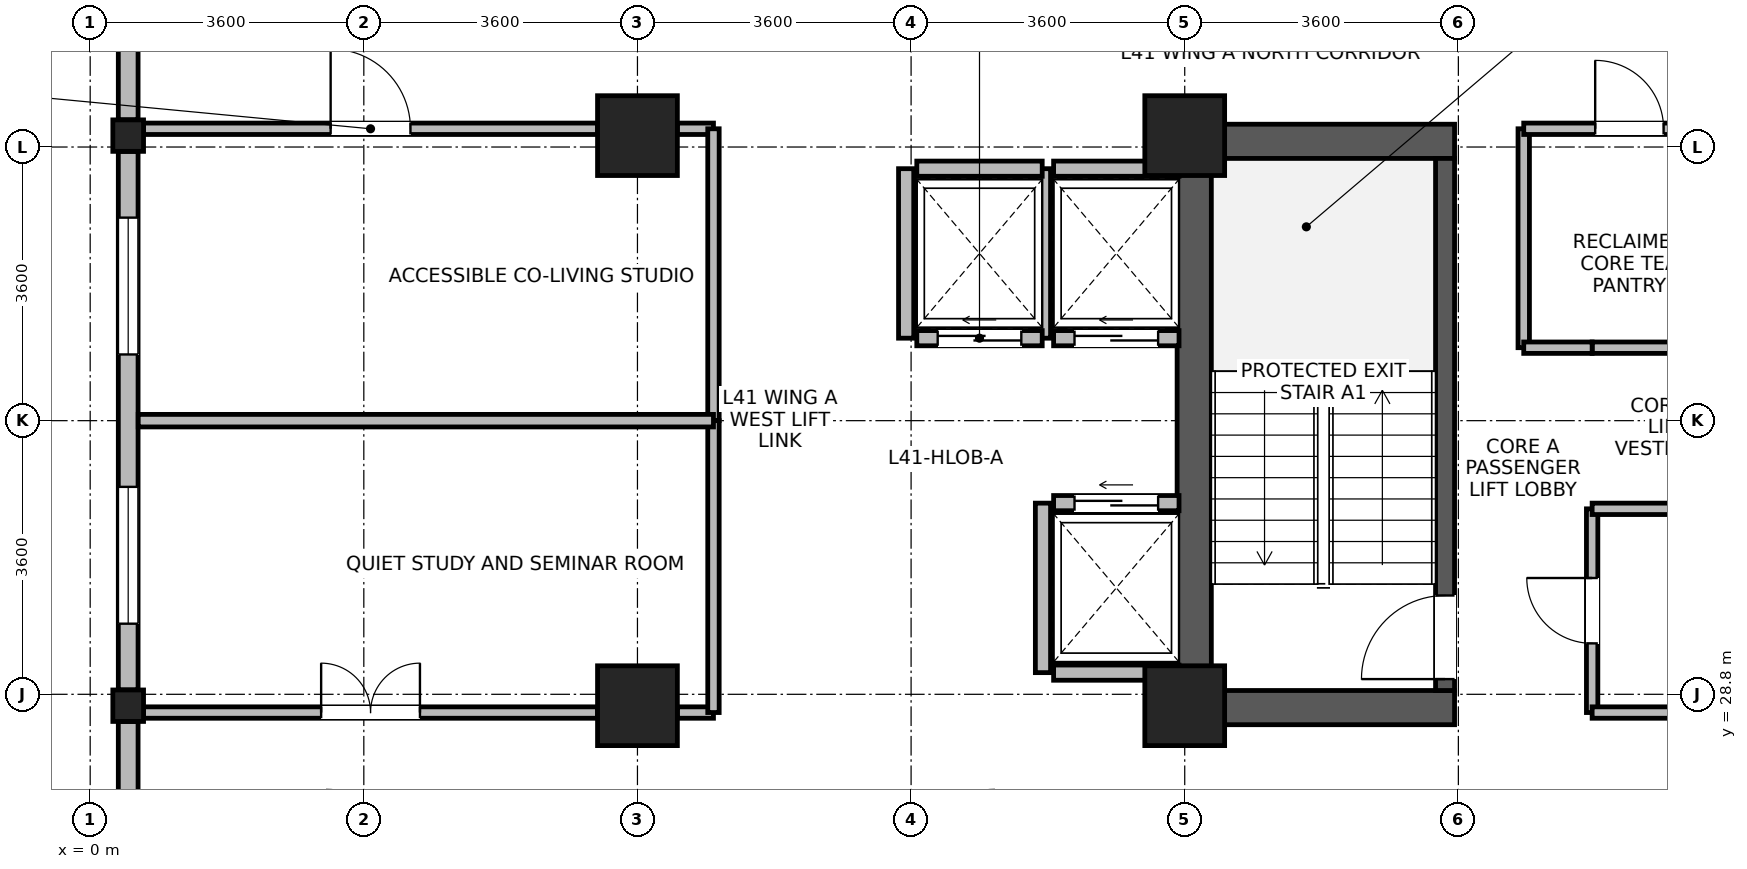
"""IFC4 building model, lengths in metres.
Left out: names, types, materials, properties, quantities, classifications, styles, units other than length and angle.
Written with IfcOpenShell. Run it as: python <this file> out.ifc"""

import sys

from ifc_helpers import new_model, si_unit, direction, frame, frame_2d, origin, origin_2d, place, context, subcontext, project, spatial, rectangle, i_section, extrude, source, transform, mapped, element, fill, save


model = new_model("IFC4")
c1 = context("Model", 3, precision=1e-05, world=origin(), true_north=direction((0.0, 1.0)))
c2 = subcontext(c1, "Body", "Model", "MODEL_VIEW")
j1 = project(units=[si_unit("LENGTHUNIT", "METRE"), si_unit("PLANEANGLEUNIT", "RADIAN")], contexts=[c1])
p1 = place(None, origin())
s1 = spatial("IfcSite", under=j1, at=p1, CompositionType="ELEMENT")
p2 = place(p1, origin())
s2 = spatial("IfcBuilding", under=s1, at=p2, CompositionType="ELEMENT")
p3 = place(p2, frame((0.0, 0.0, 162.4)))
s3 = spatial("IfcBuildingStorey", under=s2, at=p3, CompositionType="ELEMENT", Elevation=162.4)
p4 = place(p3, frame((14.525, 28.4, 0.0), z_axis=(0.0, 0.0, 1.0), x_axis=(0.0, 1.0, 0.0)))
e1 = element("IfcWall", 1, at=p4, inside=s3, PredefinedType="SHEAR", context=c2, shape_type="SweptSolid", body=[
    extrude(rectangle(XDim=7.9, YDim=0.45, at=frame_2d((3.95, 0.0))), origin(), (0.0, 0.0, 1.0), 3.46),
])
for number, where, z_axis, x_axis in (
    (2, (14.75, 28.625, 0.0), (0.0, 0.0, 1.0), (1.0, 0.0, 0.0)),
    (3, (14.75, 36.075, 0.0), (0.0, 0.0, 1.0), (1.0, 0.0, 0.0)),
):
    element("IfcWall", number, at=place(p3, frame(where, z_axis=z_axis, x_axis=x_axis)), inside=s3, PredefinedType="SHEAR", context=c2, shape_type="SweptSolid", body=[
        extrude(rectangle(XDim=3.2, YDim=0.45, at=frame_2d((1.6, 0.0))), origin(), (0.0, 0.0, 1.0), 3.46),
    ])
p5 = place(p3, frame((17.825, 28.85, 0.0), z_axis=(0.0, 0.0, 1.0), x_axis=(0.0, 1.0, 0.0)))
e4 = element("IfcWall", 4, at=p5, inside=s3, PredefinedType="SHEAR", context=c2, shape_type="SweptSolid", body=[
    extrude(rectangle(XDim=7.0, YDim=0.25, at=frame_2d((3.5, 0.0))), origin(), (0.0, 0.0, 1.0), 3.46),
])
p6 = place(p5, frame((0.15, 0.0, 0.0)))
e5 = element("IfcOpeningElement", 5, at=p6, cuts=e4, PredefinedType="OPENING", context=c2, shape_type="SweptSolid", body=[
    extrude(rectangle(XDim=1.1, YDim=2.08, at=frame_2d((0.55, 1.04))), frame((0.0, 0.135, 0.0), z_axis=(0.0, -1.0, 0.0), x_axis=(1.0, 0.0, 0.0)), (0.0, 0.0, 1.0), 0.27),
])
m1 = source(origin(), c2, "Body", "SweptSolid", [
    extrude(rectangle(XDim=1.05, YDim=1.05, at=origin_2d()), origin(), (0.0, 0.0, 1.0), 3.7),
])
for number, where, z_axis, x_axis in (
    (6, (7.2, 28.65, 0.0), (0.0, 0.0, 1.0), (1.0, 0.0, 0.0)),
    (7, (7.2, 36.15, 0.0), (0.0, 0.0, 1.0), (1.0, 0.0, 0.0)),
    (8, (14.4, 28.65, 0.0), (0.0, 0.0, 1.0), (1.0, 0.0, 0.0)),
    (9, (14.4, 36.15, 0.0), (0.0, 0.0, 1.0), (1.0, 0.0, 0.0)),
):
    element("IfcColumn", number, at=place(p3, frame(where, z_axis=z_axis, x_axis=x_axis)), inside=s3, PredefinedType="COLUMN", context=c2, shape_type="MappedRepresentation", body=[
        mapped(m1, transform((0.0, 0.0, 0.0), x_axis=(1.0, 0.0, 0.0), y_axis=(0.0, 1.0, 0.0), z_axis=(0.0, 0.0, 1.0), scale=1.0)),
    ])
m2 = source(origin(), c2, "Body", "SweptSolid", [
    extrude(i_section(OverallWidth=0.404, OverallDepth=0.414, WebThickness=0.021, FlangeThickness=0.028, FilletRadius=0.015, at=origin_2d()), origin(), (0.0, 0.0, 1.0), 3.7),
])
for number, where, z_axis, x_axis in (
    (10, (0.5, 28.65, 0.0), (0.0, 0.0, 1.0), (1.0, 0.0, 0.0)),
    (11, (0.5, 36.15, 0.0), (0.0, 0.0, 1.0), (1.0, 0.0, 0.0)),
):
    element("IfcColumn", number, at=place(p3, frame(where, z_axis=z_axis, x_axis=x_axis)), inside=s3, PredefinedType="COLUMN", context=c2, shape_type="MappedRepresentation", body=[
        mapped(m2, transform((0.0, 0.0, 0.0), x_axis=(1.0, 0.0, 0.0), y_axis=(0.0, 1.0, 0.0), z_axis=(0.0, 0.0, 1.0), scale=1.0)),
    ])
p7 = place(p3, frame((0.5, 36.358, 0.0), z_axis=(0.0, 0.0, 1.0), x_axis=(0.0, 1.0, 0.0)))
e12 = element("IfcWall", 12, at=p7, inside=s3, PredefinedType="STANDARD", context=c2, shape_type="SweptSolid", body=[
    extrude(rectangle(XDim=6.972, YDim=0.26, at=frame_2d((3.486, 0.0))), origin(), (0.0, 0.0, 1.0), 3.44),
])
p8 = place(p7, frame((4.329, 0.0, 0.85)))
e13 = element("IfcOpeningElement", 13, at=p8, cuts=e12, PredefinedType="OPENING", context=c2, shape_type="SweptSolid", body=[
    extrude(rectangle(XDim=1.8, YDim=1.85, at=frame_2d((0.9, 0.925))), frame((0.0, 0.14, 0.0), z_axis=(0.0, -1.0, 0.0), x_axis=(1.0, 0.0, 0.0)), (0.0, 0.0, 1.0), 0.28),
])
p9 = place(p7, frame((3.011, 0.0, 0.85)))
e14 = element("IfcOpeningElement", 14, at=p9, cuts=e12, PredefinedType="OPENING", context=c2, shape_type="SweptSolid", body=[
    extrude(rectangle(XDim=0.95, YDim=1.75, at=frame_2d((0.475, 0.875))), frame((0.0, 0.14, 0.0), z_axis=(0.0, -1.0, 0.0), x_axis=(1.0, 0.0, 0.0)), (0.0, 0.0, 1.0), 0.28),
])
p10 = place(p3, frame((0.5, 28.858, 0.0), z_axis=(0.0, 0.0, 1.0), x_axis=(0.0, 1.0, 0.0)))
e15 = element("IfcWall", 15, at=p10, inside=s3, PredefinedType="STANDARD", context=c2, shape_type="SweptSolid", body=[
    extrude(rectangle(XDim=7.084, YDim=0.26, at=frame_2d((3.542, 0.0))), origin(), (0.0, 0.0, 1.0), 2.99),
])
p11 = place(p10, frame((0.871, 0.0, 0.85)))
e16 = element("IfcOpeningElement", 16, at=p11, cuts=e15, PredefinedType="OPENING", context=c2, shape_type="SweptSolid", body=[
    extrude(rectangle(XDim=1.8, YDim=1.85, at=frame_2d((0.9, 0.925))), frame((0.0, 0.14, 0.0), z_axis=(0.0, -1.0, 0.0), x_axis=(1.0, 0.0, 0.0)), (0.0, 0.0, 1.0), 0.28),
])
p12 = place(p10, frame((4.413, 0.0, 0.85)))
e17 = element("IfcOpeningElement", 17, at=p12, cuts=e15, PredefinedType="OPENING", context=c2, shape_type="SweptSolid", body=[
    extrude(rectangle(XDim=1.8, YDim=1.85, at=frame_2d((0.9, 0.925))), frame((0.0, 0.14, 0.0), z_axis=(0.0, -1.0, 0.0), x_axis=(1.0, 0.0, 0.0)), (0.0, 0.0, 1.0), 0.28),
])
p13 = place(p3, frame((0.5, 21.47, 0.0), z_axis=(0.0, 0.0, 1.0), x_axis=(0.0, 1.0, 0.0)))
e18 = element("IfcWall", 18, at=p13, inside=s3, PredefinedType="STANDARD", context=c2, shape_type="SweptSolid", body=[
    extrude(rectangle(XDim=6.972, YDim=0.26, at=frame_2d((3.486, 0.0))), origin(), (0.0, 0.0, 1.0), 3.44),
])
p14 = place(p13, frame((0.843, 0.0, 0.85)))
e19 = element("IfcOpeningElement", 19, at=p14, cuts=e18, PredefinedType="OPENING", context=c2, shape_type="SweptSolid", body=[
    extrude(rectangle(XDim=1.8, YDim=1.85, at=frame_2d((0.9, 0.925))), frame((0.0, 0.14, 0.0), z_axis=(0.0, -1.0, 0.0), x_axis=(1.0, 0.0, 0.0)), (0.0, 0.0, 1.0), 0.28),
])
p15 = place(p13, frame((3.011, 0.0, 0.85)))
e20 = element("IfcOpeningElement", 20, at=p15, cuts=e18, PredefinedType="OPENING", context=c2, shape_type="SweptSolid", body=[
    extrude(rectangle(XDim=0.95, YDim=1.75, at=frame_2d((0.475, 0.875))), frame((0.0, 0.14, 0.0), z_axis=(0.0, -1.0, 0.0), x_axis=(1.0, 0.0, 0.0)), (0.0, 0.0, 1.0), 0.28),
])
p16 = place(p3, frame((12.675, 33.485, 0.0), z_axis=(0.0, 0.0, 1.0), x_axis=(1.0, 0.0, 0.0)))
e21 = element("IfcWall", 21, at=p16, inside=s3, PredefinedType="PARTITIONING", context=c2, shape_type="SweptSolid", body=[
    extrude(rectangle(XDim=1.65, YDim=0.2, at=frame_2d((0.825, 0.0))), origin(), (0.0, 0.0, 1.0), 3.44),
])
p17 = place(p16, frame((0.275, 0.0, 0.0)))
e22 = element("IfcOpeningElement", 22, at=p17, cuts=e21, PredefinedType="OPENING", context=c2, shape_type="SweptSolid", body=[
    extrude(rectangle(XDim=1.1, YDim=2.12, at=frame_2d((0.55, 1.06))), frame((0.0, 0.11, 0.0), z_axis=(0.0, -1.0, 0.0), x_axis=(1.0, 0.0, 0.0)), (0.0, 0.0, 1.0), 0.22),
])
p18 = place(p3, frame((12.675, 35.715, 0.0), z_axis=(0.0, 0.0, 1.0), x_axis=(1.0, 0.0, 0.0)))
e23 = element("IfcWall", 23, at=p18, inside=s3, PredefinedType="PARTITIONING", context=c2, shape_type="SweptSolid", body=[
    extrude(rectangle(XDim=1.65, YDim=0.2, at=frame_2d((0.825, 0.0))), origin(), (0.0, 0.0, 1.0), 3.44),
])
p19 = place(p3, frame((12.535, 33.485, 0.0), z_axis=(0.0, 0.0, 1.0), x_axis=(0.0, 1.0, 0.0)))
e24 = element("IfcWall", 24, at=p19, inside=s3, PredefinedType="PARTITIONING", context=c2, shape_type="SweptSolid", body=[
    extrude(rectangle(XDim=2.23, YDim=0.2, at=frame_2d((1.115, 0.0))), origin(), (0.0, 0.0, 1.0), 3.44),
])
p20 = place(p3, frame((12.675, 29.085, 0.0), z_axis=(0.0, 0.0, 1.0), x_axis=(1.0, 0.0, 0.0)))
e25 = element("IfcWall", 25, at=p20, inside=s3, PredefinedType="PARTITIONING", context=c2, shape_type="SweptSolid", body=[
    extrude(rectangle(XDim=1.65, YDim=0.2, at=frame_2d((0.825, 0.0))), origin(), (0.0, 0.0, 1.0), 3.44),
])
p21 = place(p3, frame((12.675, 31.315, 0.0), z_axis=(0.0, 0.0, 1.0), x_axis=(1.0, 0.0, 0.0)))
e26 = element("IfcWall", 26, at=p21, inside=s3, PredefinedType="PARTITIONING", context=c2, shape_type="SweptSolid", body=[
    extrude(rectangle(XDim=1.65, YDim=0.2, at=frame_2d((0.825, 0.0))), origin(), (0.0, 0.0, 1.0), 3.44),
])
p22 = place(p21, frame((0.275, 0.0, 0.0)))
e27 = element("IfcOpeningElement", 27, at=p22, cuts=e26, PredefinedType="OPENING", context=c2, shape_type="SweptSolid", body=[
    extrude(rectangle(XDim=1.1, YDim=2.12, at=frame_2d((0.55, 1.06))), frame((0.0, 0.11, 0.0), z_axis=(0.0, -1.0, 0.0), x_axis=(1.0, 0.0, 0.0)), (0.0, 0.0, 1.0), 0.22),
])
p23 = place(p3, frame((12.535, 29.085, 0.0), z_axis=(0.0, 0.0, 1.0), x_axis=(0.0, 1.0, 0.0)))
e28 = element("IfcWall", 28, at=p23, inside=s3, PredefinedType="PARTITIONING", context=c2, shape_type="SweptSolid", body=[
    extrude(rectangle(XDim=2.23, YDim=0.2, at=frame_2d((1.115, 0.0))), origin(), (0.0, 0.0, 1.0), 3.44),
])
p24 = place(p3, frame((10.875, 33.485, 0.0), z_axis=(0.0, 0.0, 1.0), x_axis=(1.0, 0.0, 0.0)))
e29 = element("IfcWall", 29, at=p24, inside=s3, PredefinedType="PARTITIONING", context=c2, shape_type="SweptSolid", body=[
    extrude(rectangle(XDim=1.65, YDim=0.2, at=frame_2d((0.825, 0.0))), origin(), (0.0, 0.0, 1.0), 3.44),
])
p25 = place(p24, frame((0.275, 0.0, 0.0)))
e30 = element("IfcOpeningElement", 30, at=p25, cuts=e29, PredefinedType="OPENING", context=c2, shape_type="SweptSolid", body=[
    extrude(rectangle(XDim=1.1, YDim=2.12, at=frame_2d((0.55, 1.06))), frame((0.0, 0.11, 0.0), z_axis=(0.0, -1.0, 0.0), x_axis=(1.0, 0.0, 0.0)), (0.0, 0.0, 1.0), 0.22),
])
p26 = place(p3, frame((10.875, 35.715, 0.0), z_axis=(0.0, 0.0, 1.0), x_axis=(1.0, 0.0, 0.0)))
e31 = element("IfcWall", 31, at=p26, inside=s3, PredefinedType="PARTITIONING", context=c2, shape_type="SweptSolid", body=[
    extrude(rectangle(XDim=1.65, YDim=0.2, at=frame_2d((0.825, 0.0))), origin(), (0.0, 0.0, 1.0), 3.44),
])
p27 = place(p3, frame((10.735, 33.485, 0.0), z_axis=(0.0, 0.0, 1.0), x_axis=(0.0, 1.0, 0.0)))
e32 = element("IfcWall", 32, at=p27, inside=s3, PredefinedType="PARTITIONING", context=c2, shape_type="SweptSolid", body=[
    extrude(rectangle(XDim=2.23, YDim=0.2, at=frame_2d((1.115, 0.0))), origin(), (0.0, 0.0, 1.0), 3.44),
])
p28 = place(p3, frame((0.702, 28.56, 0.0), z_axis=(0.0, 0.0, 1.0), x_axis=(1.0, 0.0, 0.0)))
e33 = element("IfcWall", 33, at=p28, inside=s3, PredefinedType="PARTITIONING", context=c2, shape_type="SweptSolid", body=[
    extrude(rectangle(XDim=5.973, YDim=0.15, at=frame_2d((2.987, 0.0))), origin(), (0.0, 0.0, 1.0), 2.84),
])
p29 = place(p28, frame((2.336, 0.0, 0.0)))
e34 = element("IfcOpeningElement", 34, at=p29, cuts=e33, PredefinedType="OPENING", context=c2, shape_type="SweptSolid", body=[
    extrude(rectangle(XDim=1.3, YDim=2.12, at=frame_2d((0.65, 1.06))), frame((0.0, 0.085, 0.0), z_axis=(0.0, -1.0, 0.0), x_axis=(1.0, 0.0, 0.0)), (0.0, 0.0, 1.0), 0.17),
])
p30 = place(p3, frame((7.725, 28.56, 0.0), z_axis=(0.0, 0.0, 1.0), x_axis=(1.0, 0.0, 0.0)))
e35 = element("IfcWall", 35, at=p30, inside=s3, PredefinedType="PARTITIONING", context=c2, shape_type="SweptSolid", body=[
    extrude(rectangle(XDim=0.475, YDim=0.15, at=frame_2d((0.237, 0.0))), origin(), (0.0, 0.0, 1.0), 2.84),
])
p31 = place(p3, frame((0.702, 36.24, 0.0), z_axis=(0.0, 0.0, 1.0), x_axis=(1.0, 0.0, 0.0)))
e36 = element("IfcWall", 36, at=p31, inside=s3, PredefinedType="PARTITIONING", context=c2, shape_type="SweptSolid", body=[
    extrude(rectangle(XDim=5.973, YDim=0.15, at=frame_2d((2.987, 0.0))), origin(), (0.0, 0.0, 1.0), 2.84),
])
p32 = place(p31, frame((2.461, 0.0, 0.0)))
e37 = element("IfcOpeningElement", 37, at=p32, cuts=e36, PredefinedType="OPENING", context=c2, shape_type="SweptSolid", body=[
    extrude(rectangle(XDim=1.05, YDim=2.12, at=frame_2d((0.525, 1.06))), frame((0.0, 0.085, 0.0), z_axis=(0.0, -1.0, 0.0), x_axis=(1.0, 0.0, 0.0)), (0.0, 0.0, 1.0), 0.17),
])
p33 = place(p3, frame((7.725, 36.24, 0.0), z_axis=(0.0, 0.0, 1.0), x_axis=(1.0, 0.0, 0.0)))
e38 = element("IfcWall", 38, at=p33, inside=s3, PredefinedType="PARTITIONING", context=c2, shape_type="SweptSolid", body=[
    extrude(rectangle(XDim=0.475, YDim=0.15, at=frame_2d((0.237, 0.0))), origin(), (0.0, 0.0, 1.0), 2.84),
])
p34 = place(p3, frame((8.2, 32.4, 0.0), z_axis=(0.0, 0.0, 1.0), x_axis=(0.0, 1.0, 0.0)))
e39 = element("IfcWall", 39, at=p34, inside=s3, PredefinedType="PARTITIONING", context=c2, shape_type="SweptSolid", body=[
    extrude(rectangle(XDim=3.84, YDim=0.15, at=frame_2d((1.92, 0.0))), origin(), (0.0, 0.0, 1.0), 3.44),
])
p35 = place(p3, frame((8.2, 28.56, 0.0), z_axis=(0.0, 0.0, 1.0), x_axis=(0.0, 1.0, 0.0)))
e40 = element("IfcWall", 40, at=p35, inside=s3, PredefinedType="PARTITIONING", context=c2, shape_type="SweptSolid", body=[
    extrude(rectangle(XDim=3.84, YDim=0.15, at=frame_2d((1.92, 0.0))), origin(), (0.0, 0.0, 1.0), 3.44),
])
p36 = place(p3, frame((18.86, 33.36, 0.0), z_axis=(0.0, 0.0, 1.0), x_axis=(0.0, 1.0, 0.0)))
e41 = element("IfcWall", 41, at=p36, inside=s3, PredefinedType="PARTITIONING", context=c2, shape_type="SweptSolid", body=[
    extrude(rectangle(XDim=2.88, YDim=0.15, at=frame_2d((1.44, 0.0))), origin(), (0.0, 0.0, 1.0), 3.44),
])
p37 = place(p3, frame((18.86, 36.24, 0.0), z_axis=(0.0, 0.0, 1.0), x_axis=(1.0, 0.0, 0.0)))
e42 = element("IfcWall", 42, at=p37, inside=s3, PredefinedType="PARTITIONING", context=c2, shape_type="SweptSolid", body=[
    extrude(rectangle(XDim=2.78, YDim=0.15, at=frame_2d((1.39, 0.0))), origin(), (0.0, 0.0, 1.0), 2.44),
])
p38 = place(p37, frame((0.94, 0.0, 0.0)))
e43 = element("IfcOpeningElement", 43, at=p38, cuts=e42, PredefinedType="OPENING", context=c2, shape_type="SweptSolid", body=[
    extrude(rectangle(XDim=0.9, YDim=2.08, at=frame_2d((0.45, 1.04))), frame((0.0, 0.085, 0.0), z_axis=(0.0, -1.0, 0.0), x_axis=(1.0, 0.0, 0.0)), (0.0, 0.0, 1.0), 0.17),
])
p39 = place(p3, frame((19.76, 28.56, 0.0), z_axis=(0.0, 0.0, 1.0), x_axis=(0.0, 1.0, 0.0)))
e44 = element("IfcWall", 44, at=p39, inside=s3, PredefinedType="PARTITIONING", context=c2, shape_type="SweptSolid", body=[
    extrude(rectangle(XDim=2.68, YDim=0.15, at=frame_2d((1.34, 0.0))), origin(), (0.0, 0.0, 1.0), 3.44),
])
p40 = place(p39, frame((0.91, 0.0, 0.0)))
e45 = element("IfcOpeningElement", 45, at=p40, cuts=e44, PredefinedType="OPENING", context=c2, shape_type="SweptSolid", body=[
    extrude(rectangle(XDim=0.86, YDim=2.02, at=frame_2d((0.43, 1.01))), frame((0.0, 0.085, 0.0), z_axis=(0.0, -1.0, 0.0), x_axis=(1.0, 0.0, 0.0)), (0.0, 0.0, 1.0), 0.17),
])
p41 = place(p3, frame((19.76, 28.56, 0.0), z_axis=(0.0, 0.0, 1.0), x_axis=(1.0, 0.0, 0.0)))
e46 = element("IfcWall", 46, at=p41, inside=s3, PredefinedType="PARTITIONING", context=c2, shape_type="SweptSolid", body=[
    extrude(rectangle(XDim=2.0, YDim=0.15, at=frame_2d((1.0, 0.0))), origin(), (0.0, 0.0, 1.0), 2.44),
])
p42 = place(p3, frame((19.76, 31.24, 0.0), z_axis=(0.0, 0.0, 1.0), x_axis=(1.0, 0.0, 0.0)))
e47 = element("IfcWall", 47, at=p42, inside=s3, PredefinedType="PARTITIONING", context=c2, shape_type="SweptSolid", body=[
    extrude(rectangle(XDim=2.0, YDim=0.15, at=frame_2d((1.0, 0.0))), origin(), (0.0, 0.0, 1.0), 3.44),
])
p43 = place(p3, frame((19.76, 33.36, 0.0), z_axis=(0.0, 0.0, 1.0), x_axis=(1.0, 0.0, 0.0)))
e48 = element("IfcWall", 48, at=p43, inside=s3, PredefinedType="PARTITIONING", context=c2, shape_type="SweptSolid", body=[
    extrude(rectangle(XDim=1.85, YDim=0.15, at=frame_2d((0.925, 0.0))), origin(), (0.0, 0.0, 1.0), 3.44),
])
p44 = place(p3, frame((18.86, 33.36, 0.0), z_axis=(0.0, 0.0, 1.0), x_axis=(1.0, 0.0, 0.0)))
e49 = element("IfcWall", 49, at=p44, inside=s3, PredefinedType="PARTITIONING", context=c2, shape_type="SweptSolid", body=[
    extrude(rectangle(XDim=0.9, YDim=0.15, at=frame_2d((0.45, 0.0))), origin(), (0.0, 0.0, 1.0), 3.44),
])
p45 = place(p3, frame((0.632, 32.4, 0.0), z_axis=(0.0, 0.0, 1.0), x_axis=(1.0, 0.0, 0.0)))
e50 = element("IfcWall", 50, at=p45, inside=s3, PredefinedType="PARTITIONING", context=c2, shape_type="SweptSolid", body=[
    extrude(rectangle(XDim=7.568, YDim=0.165, at=frame_2d((3.784, 0.0))), origin(), (0.0, 0.0, 1.0), 3.44),
])
p46 = place(p11, origin())
e51 = element("IfcWindow", 51, at=p46, inside=s3, PartitioningType="SINGLE_PANEL", PredefinedType="WINDOW", context=c2, shape_type="SweptSolid", body=[
    extrude(rectangle(XDim=1.8, YDim=1.85, at=frame_2d((0.9, 0.925))), frame((0.0, 0.03, 0.0), z_axis=(0.0, -1.0, 0.0), x_axis=(1.0, 0.0, 0.0)), (0.0, 0.0, 1.0), 0.06),
])
fill(e16, e51)
p47 = place(p12, origin())
e52 = element("IfcWindow", 52, at=p47, inside=s3, PartitioningType="SINGLE_PANEL", PredefinedType="WINDOW", context=c2, shape_type="SweptSolid", body=[
    extrude(rectangle(XDim=1.8, YDim=1.85, at=frame_2d((0.9, 0.925))), frame((0.0, 0.03, 0.0), z_axis=(0.0, -1.0, 0.0), x_axis=(1.0, 0.0, 0.0)), (0.0, 0.0, 1.0), 0.06),
])
fill(e17, e52)
p48 = place(p6, origin())
e53 = element("IfcDoor", 53, at=p48, inside=s3, OperationType="SINGLE_SWING_LEFT", PredefinedType="DOOR", context=c2, shape_type="SweptSolid", body=[
    extrude(rectangle(XDim=1.1, YDim=2.08, at=frame_2d((0.55, 1.04))), frame((0.0, 0.025, 0.0), z_axis=(0.0, -1.0, 0.0), x_axis=(1.0, 0.0, 0.0)), (0.0, 0.0, 1.0), 0.05),
])
fill(e5, e53)
p49 = place(p17, origin())
e54 = element("IfcDoor", 54, at=p49, inside=s3, OperationType="SLIDING_TO_LEFT", PredefinedType="DOOR", context=c2, shape_type="SweptSolid", body=[
    extrude(rectangle(XDim=1.1, YDim=2.12, at=frame_2d((0.55, 1.06))), frame((0.0, 0.025, 0.0), z_axis=(0.0, -1.0, 0.0), x_axis=(1.0, 0.0, 0.0)), (0.0, 0.0, 1.0), 0.05),
])
fill(e22, e54)
p50 = place(p22, origin())
e55 = element("IfcDoor", 55, at=p50, inside=s3, OperationType="SLIDING_TO_LEFT", PredefinedType="DOOR", context=c2, shape_type="SweptSolid", body=[
    extrude(rectangle(XDim=1.1, YDim=2.12, at=frame_2d((0.55, 1.06))), frame((0.0, 0.025, 0.0), z_axis=(0.0, -1.0, 0.0), x_axis=(1.0, 0.0, 0.0)), (0.0, 0.0, 1.0), 0.05),
])
fill(e27, e55)
p51 = place(p25, origin())
e56 = element("IfcDoor", 56, at=p51, inside=s3, OperationType="SLIDING_TO_LEFT", PredefinedType="DOOR", context=c2, shape_type="SweptSolid", body=[
    extrude(rectangle(XDim=1.1, YDim=2.12, at=frame_2d((0.55, 1.06))), frame((0.0, 0.025, 0.0), z_axis=(0.0, -1.0, 0.0), x_axis=(1.0, 0.0, 0.0)), (0.0, 0.0, 1.0), 0.05),
])
fill(e30, e56)
p52 = place(p29, origin())
e57 = element("IfcDoor", 57, at=p52, inside=s3, OperationType="DOUBLE_DOOR_SINGLE_SWING", PredefinedType="DOOR", context=c2, shape_type="SweptSolid", body=[
    extrude(rectangle(XDim=1.3, YDim=2.12, at=frame_2d((0.65, 1.06))), frame((0.0, 0.025, 0.0), z_axis=(0.0, -1.0, 0.0), x_axis=(1.0, 0.0, 0.0)), (0.0, 0.0, 1.0), 0.05),
])
fill(e34, e57)
p53 = place(p32, origin())
e58 = element("IfcDoor", 58, at=p53, inside=s3, OperationType="SINGLE_SWING_LEFT", PredefinedType="DOOR", context=c2, shape_type="SweptSolid", body=[
    extrude(rectangle(XDim=1.05, YDim=2.12, at=frame_2d((0.525, 1.06))), frame((0.0, 0.025, 0.0), z_axis=(0.0, -1.0, 0.0), x_axis=(1.0, 0.0, 0.0)), (0.0, 0.0, 1.0), 0.05),
])
fill(e37, e58)
p54 = place(p38, origin())
e59 = element("IfcDoor", 59, at=p54, inside=s3, OperationType="SINGLE_SWING_LEFT", PredefinedType="DOOR", context=c2, shape_type="SweptSolid", body=[
    extrude(rectangle(XDim=0.9, YDim=2.08, at=frame_2d((0.45, 1.04))), frame((0.0, 0.025, 0.0), z_axis=(0.0, -1.0, 0.0), x_axis=(1.0, 0.0, 0.0)), (0.0, 0.0, 1.0), 0.05),
])
fill(e43, e59)
p55 = place(p40, origin())
e60 = element("IfcDoor", 60, at=p55, inside=s3, OperationType="SINGLE_SWING_RIGHT", PredefinedType="DOOR", context=c2, shape_type="SweptSolid", body=[
    extrude(rectangle(XDim=0.86, YDim=2.02, at=frame_2d((0.43, 1.01))), frame((0.0, 0.025, 0.0), z_axis=(0.0, -1.0, 0.0), x_axis=(1.0, 0.0, 0.0)), (0.0, 0.0, 1.0), 0.05),
])
fill(e45, e60)
save(model, sys.argv[1])
